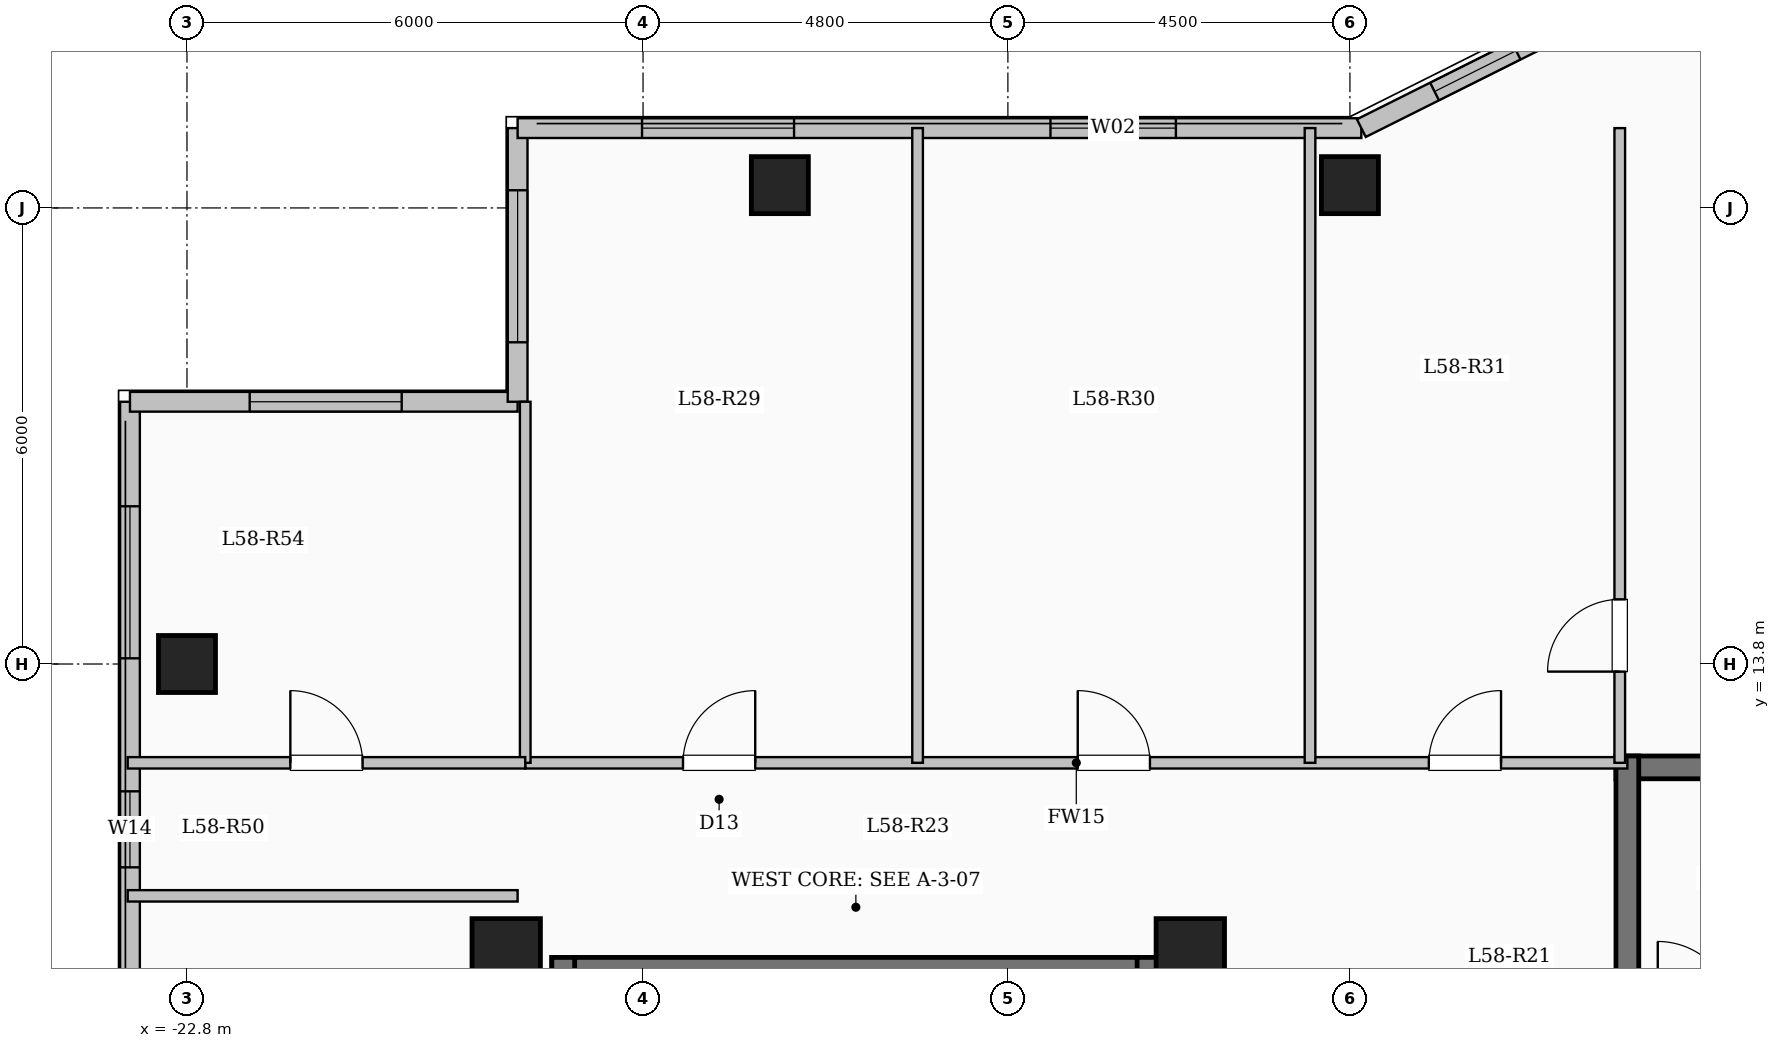
"""IFC4 building model, lengths in metres.
Left out: names, types, materials, properties, quantities, classifications, styles, units other than length and angle.
Written with IfcOpenShell. Run it as: python <this file> out.ifc"""

import sys

from ifc_helpers import new_model, si_unit, direction, frame, frame_2d, origin, origin_2d, place, context, subcontext, project, spatial, rectangle, extrude, element, fill, save


model = new_model("IFC4")
c1 = context("Model", 3, precision=1e-05, world=origin(), true_north=direction((0.0, 1.0)))
c2 = subcontext(c1, "Body", "Model", "MODEL_VIEW")
j1 = project(units=[si_unit("LENGTHUNIT", "METRE"), si_unit("PLANEANGLEUNIT", "RADIAN")], contexts=[c1])
p1 = place(None, origin())
s1 = spatial("IfcSite", under=j1, at=p1, CompositionType="ELEMENT")
p2 = place(p1, origin())
s2 = spatial("IfcBuilding", under=s1, at=p2, CompositionType="ELEMENT")
p3 = place(p2, frame((0.0, 0.0, 213.7)))
s3 = spatial("IfcBuildingStorey", under=s2, at=p3, CompositionType="ELEMENT", Elevation=213.7)
for number, where, z_axis, x_axis in (
    (1, (-9.6, 10.0, 0.0), (0.0, 0.0, 1.0), (1.0, 0.0, 0.0)),
    (2, (-18.6, 10.0, 0.0), (0.0, 0.0, 1.0), (1.0, 0.0, 0.0)),
):
    element("IfcColumn", number, at=place(p3, frame(where, z_axis=z_axis, x_axis=x_axis)), inside=s3, PredefinedType="COLUMN", context=c2, shape_type="SweptSolid", body=[
        extrude(rectangle(XDim=0.9, YDim=0.9, at=origin_2d()), origin(), (0.0, 0.0, 1.0), 3.35),
    ])
for number, where, z_axis, x_axis in (
    (3, (-15.0, 20.1, 0.0), (0.0, 0.0, 1.0), (1.0, 0.0, 0.0)),
    (4, (-7.5, 20.1, 0.0), (0.0, 0.0, 1.0), (1.0, 0.0, 0.0)),
    (5, (-22.8, 13.8, 0.0), (0.0, 0.0, 1.0), (1.0, 0.0, 0.0)),
):
    element("IfcColumn", number, at=place(p3, frame(where, z_axis=z_axis, x_axis=x_axis)), inside=s3, PredefinedType="COLUMN", context=c2, shape_type="SweptSolid", body=[
        extrude(rectangle(XDim=0.75, YDim=0.75, at=origin_2d()), origin(), (0.0, 0.0, 1.0), 3.35),
    ])
p4 = place(p3, frame((-23.55, -17.25, 0.0), z_axis=(0.0, 0.0, 1.0), x_axis=(0.0, 1.0, 0.0)))
e6 = element("IfcWall", 6, at=p4, inside=s3, PredefinedType="SOLIDWALL", context=c2, shape_type="SweptSolid", body=[
    extrude(rectangle(XDim=34.5, YDim=0.26, at=frame_2d((17.25, 0.0))), origin(), (0.0, 0.0, 1.0), 3.1),
])
p5 = place(p4, frame((2.825, 0.0, 0.9)))
e7 = element("IfcOpeningElement", 7, at=p5, cuts=e6, PredefinedType="OPENING", context=c2, shape_type="SweptSolid", body=[
    extrude(rectangle(XDim=2.2, YDim=1.75, at=frame_2d((1.1, 0.875))), frame((0.0, 0.14, 0.0), z_axis=(0.0, -1.0, 0.0), x_axis=(1.0, 0.0, 0.0)), (0.0, 0.0, 1.0), 0.28),
])
p6 = place(p4, frame((8.325, 0.0, 0.95)))
e8 = element("IfcOpeningElement", 8, at=p6, cuts=e6, PredefinedType="OPENING", context=c2, shape_type="SweptSolid", body=[
    extrude(rectangle(XDim=1.2, YDim=1.5, at=frame_2d((0.6, 0.75))), frame((0.0, 0.14, 0.0), z_axis=(0.0, -1.0, 0.0), x_axis=(1.0, 0.0, 0.0)), (0.0, 0.0, 1.0), 0.28),
])
p7 = place(p4, frame((18.0, 0.0, 0.9)))
e9 = element("IfcOpeningElement", 9, at=p7, cuts=e6, PredefinedType="OPENING", context=c2, shape_type="SweptSolid", body=[
    extrude(rectangle(XDim=2.0, YDim=1.7, at=frame_2d((1.0, 0.85))), frame((0.0, 0.14, 0.0), z_axis=(0.0, -1.0, 0.0), x_axis=(1.0, 0.0, 0.0)), (0.0, 0.0, 1.0), 0.28),
])
p8 = place(p4, frame((28.375, 0.0, 0.95)))
e10 = element("IfcOpeningElement", 10, at=p8, cuts=e6, PredefinedType="OPENING", context=c2, shape_type="SweptSolid", body=[
    extrude(rectangle(XDim=1.0, YDim=1.5, at=frame_2d((0.5, 0.75))), frame((0.0, 0.14, 0.0), z_axis=(0.0, -1.0, 0.0), x_axis=(1.0, 0.0, 0.0)), (0.0, 0.0, 1.0), 0.28),
])
p9 = place(p4, frame((31.125, 0.0, 0.9)))
e11 = element("IfcOpeningElement", 11, at=p9, cuts=e6, PredefinedType="OPENING", context=c2, shape_type="SweptSolid", body=[
    extrude(rectangle(XDim=2.0, YDim=1.7, at=frame_2d((1.0, 0.85))), frame((0.0, 0.14, 0.0), z_axis=(0.0, -1.0, 0.0), x_axis=(1.0, 0.0, 0.0)), (0.0, 0.0, 1.0), 0.28),
])
p10 = place(p3, frame((-23.55, 17.25, 0.0), z_axis=(0.0, 0.0, 1.0), x_axis=(1.0, 0.0, 0.0)))
e12 = element("IfcWall", 12, at=p10, inside=s3, PredefinedType="SOLIDWALL", context=c2, shape_type="SweptSolid", body=[
    extrude(rectangle(XDim=5.1, YDim=0.26, at=frame_2d((2.55, 0.0))), origin(), (0.0, 0.0, 1.0), 3.1),
])
p11 = place(p10, frame((1.575, 0.0, 0.9)))
e13 = element("IfcOpeningElement", 13, at=p11, cuts=e12, PredefinedType="OPENING", context=c2, shape_type="SweptSolid", body=[
    extrude(rectangle(XDim=2.0, YDim=1.7, at=frame_2d((1.0, 0.85))), frame((0.0, 0.14, 0.0), z_axis=(0.0, -1.0, 0.0), x_axis=(1.0, 0.0, 0.0)), (0.0, 0.0, 1.0), 0.28),
])
p12 = place(p3, frame((-18.45, 17.25, 0.0), z_axis=(0.0, 0.0, 1.0), x_axis=(0.0, 1.0, 0.0)))
e14 = element("IfcWall", 14, at=p12, inside=s3, PredefinedType="SOLIDWALL", context=c2, shape_type="SweptSolid", body=[
    extrude(rectangle(XDim=3.6, YDim=0.26, at=frame_2d((1.8, 0.0))), origin(), (0.0, 0.0, 1.0), 3.1),
])
p13 = place(p12, frame((0.782, 0.0, 0.9)))
e15 = element("IfcOpeningElement", 15, at=p13, cuts=e14, PredefinedType="OPENING", context=c2, shape_type="SweptSolid", body=[
    extrude(rectangle(XDim=2.0, YDim=1.7, at=frame_2d((1.0, 0.85))), frame((0.0, 0.14, 0.0), z_axis=(0.0, -1.0, 0.0), x_axis=(1.0, 0.0, 0.0)), (0.0, 0.0, 1.0), 0.28),
])
p14 = place(p3, frame((-18.45, 20.85, 0.0), z_axis=(0.0, 0.0, 1.0), x_axis=(1.0, 0.0, 0.0)))
e16 = element("IfcWall", 16, at=p14, inside=s3, PredefinedType="SOLIDWALL", context=c2, shape_type="SweptSolid", body=[
    extrude(rectangle(XDim=11.1, YDim=0.26, at=frame_2d((5.55, 0.0))), origin(), (0.0, 0.0, 1.0), 3.1),
])
p15 = place(p14, frame((1.637, 0.0, 0.9)))
e17 = element("IfcOpeningElement", 17, at=p15, cuts=e16, PredefinedType="OPENING", context=c2, shape_type="SweptSolid", body=[
    extrude(rectangle(XDim=2.0, YDim=1.7, at=frame_2d((1.0, 0.85))), frame((0.0, 0.14, 0.0), z_axis=(0.0, -1.0, 0.0), x_axis=(1.0, 0.0, 0.0)), (0.0, 0.0, 1.0), 0.28),
])
p16 = place(p14, frame((7.01, 0.0, 0.9)))
e18 = element("IfcOpeningElement", 18, at=p16, cuts=e16, PredefinedType="OPENING", context=c2, shape_type="SweptSolid", body=[
    extrude(rectangle(XDim=1.65, YDim=1.6, at=frame_2d((0.825, 0.8))), frame((0.0, 0.14, 0.0), z_axis=(0.0, -1.0, 0.0), x_axis=(1.0, 0.0, 0.0)), (0.0, 0.0, 1.0), 0.28),
])
p17 = place(p3, frame((-7.35, 20.85, 0.0), z_axis=(0.0, 0.0, 1.0), x_axis=(0.894427191, 0.4472135955, 0.0)))
e19 = element("IfcWall", 19, at=p17, inside=s3, PredefinedType="SOLIDWALL", context=c2, shape_type="SweptSolid", body=[
    extrude(rectangle(XDim=3.354, YDim=0.26, at=frame_2d((1.677, 0.0))), origin(), (0.0, 0.0, 1.0), 3.1),
])
p18 = place(p17, frame((1.077, 0.0, 0.95)))
e20 = element("IfcOpeningElement", 20, at=p18, cuts=e19, PredefinedType="OPENING", context=c2, shape_type="SweptSolid", body=[
    extrude(rectangle(XDim=1.2, YDim=1.5, at=frame_2d((0.6, 0.75))), frame((0.0, 0.14, 0.0), z_axis=(0.0, -1.0, 0.0), x_axis=(1.0, 0.0, 0.0)), (0.0, 0.0, 1.0), 0.28),
])
p19 = place(p3, frame((-18.0, 9.79, 0.0), z_axis=(0.0, 0.0, 1.0), x_axis=(1.0, 0.0, 0.0)))
e21 = element("IfcWall", 21, at=p19, inside=s3, PredefinedType="SHEAR", context=c2, shape_type="SweptSolid", body=[
    extrude(rectangle(XDim=8.0, YDim=0.3, at=frame_2d((4.0, 0.0))), origin(), (0.0, 0.0, 1.0), 3.35),
])
for number, where, z_axis, x_axis in (
    (22, (-17.85, 6.35, 0.0), (0.0, 0.0, 1.0), (0.0, 1.0, 0.0)),
    (23, (-10.15, 6.35, 0.0), (0.0, 0.0, 1.0), (0.0, 1.0, 0.0)),
):
    element("IfcWall", number, at=place(p3, frame(where, z_axis=z_axis, x_axis=x_axis)), inside=s3, PredefinedType="SHEAR", context=c2, shape_type="SweptSolid", body=[
        extrude(rectangle(XDim=3.59, YDim=0.3, at=frame_2d((1.795, 0.0))), origin(), (0.0, 0.0, 1.0), 3.35),
    ])
p20 = place(p3, frame((-4.0, 12.44, 0.0), z_axis=(0.0, 0.0, 1.0), x_axis=(1.0, 0.0, 0.0)))
e24 = element("IfcWall", 24, at=p20, inside=s3, PredefinedType="SHEAR", context=c2, shape_type="SweptSolid", body=[
    extrude(rectangle(XDim=8.0, YDim=0.3, at=frame_2d((4.0, 0.0))), origin(), (0.0, 0.0, 1.0), 3.35),
])
p21 = place(p3, frame((-3.85, 9.0, 0.0), z_axis=(0.0, 0.0, 1.0), x_axis=(0.0, 1.0, 0.0)))
e25 = element("IfcWall", 25, at=p21, inside=s3, PredefinedType="SHEAR", context=c2, shape_type="SweptSolid", body=[
    extrude(rectangle(XDim=3.59, YDim=0.3, at=frame_2d((1.795, 0.0))), origin(), (0.0, 0.0, 1.0), 3.35),
])
p22 = place(p3, frame((-18.35, 12.5, 0.0), z_axis=(0.0, 0.0, 1.0), x_axis=(1.0, 0.0, 0.0)))
e26 = element("IfcWall", 26, at=p22, inside=s3, PredefinedType="PARTITIONING", context=c2, shape_type="SweptSolid", body=[
    extrude(rectangle(XDim=14.5, YDim=0.15, at=frame_2d((7.25, 0.0))), origin(), (0.0, 0.0, 1.0), 3.1),
])
p23 = place(p22, frame((2.076, 0.0, 0.0)))
e27 = element("IfcOpeningElement", 27, at=p23, cuts=e26, PredefinedType="OPENING", context=c2, shape_type="SweptSolid", body=[
    extrude(rectangle(XDim=0.95, YDim=2.15, at=frame_2d((0.475, 1.075))), frame((0.0, 0.085, 0.0), z_axis=(0.0, -1.0, 0.0), x_axis=(1.0, 0.0, 0.0)), (0.0, 0.0, 1.0), 0.17),
])
p24 = place(p22, frame((7.269, 0.0, 0.0)))
e28 = element("IfcOpeningElement", 28, at=p24, cuts=e26, PredefinedType="OPENING", context=c2, shape_type="SweptSolid", body=[
    extrude(rectangle(XDim=0.95, YDim=2.15, at=frame_2d((0.475, 1.075))), frame((0.0, 0.085, 0.0), z_axis=(0.0, -1.0, 0.0), x_axis=(1.0, 0.0, 0.0)), (0.0, 0.0, 1.0), 0.17),
])
p25 = place(p22, frame((11.888, 0.0, 0.0)))
e29 = element("IfcOpeningElement", 29, at=p25, cuts=e26, PredefinedType="OPENING", context=c2, shape_type="SweptSolid", body=[
    extrude(rectangle(XDim=0.95, YDim=2.15, at=frame_2d((0.475, 1.075))), frame((0.0, 0.085, 0.0), z_axis=(0.0, -1.0, 0.0), x_axis=(1.0, 0.0, 0.0)), (0.0, 0.0, 1.0), 0.17),
])
p26 = place(p3, frame((-3.95, 12.5, 0.0), z_axis=(0.0, 0.0, 1.0), x_axis=(0.0, 1.0, 0.0)))
e30 = element("IfcWall", 30, at=p26, inside=s3, PredefinedType="PARTITIONING", context=c2, shape_type="SweptSolid", body=[
    extrude(rectangle(XDim=8.35, YDim=0.14, at=frame_2d((4.175, 0.0))), origin(), (0.0, 0.0, 1.0), 3.1),
])
p27 = place(p26, frame((1.2, 0.0, 0.0)))
e31 = element("IfcOpeningElement", 31, at=p27, cuts=e30, PredefinedType="OPENING", context=c2, shape_type="SweptSolid", body=[
    extrude(rectangle(XDim=0.95, YDim=2.15, at=frame_2d((0.475, 1.075))), frame((0.0, 0.08, 0.0), z_axis=(0.0, -1.0, 0.0), x_axis=(1.0, 0.0, 0.0)), (0.0, 0.0, 1.0), 0.16),
])
p28 = place(p3, frame((-13.188, 12.5, 0.0), z_axis=(0.0, 0.0, 1.0), x_axis=(0.0, 1.0, 0.0)))
e32 = element("IfcWall", 32, at=p28, inside=s3, PredefinedType="PARTITIONING", context=c2, shape_type="SweptSolid", body=[
    extrude(rectangle(XDim=8.35, YDim=0.14, at=frame_2d((4.175, 0.0))), origin(), (0.0, 0.0, 1.0), 3.1),
])
p29 = place(p3, frame((-8.025, 12.5, 0.0), z_axis=(0.0, 0.0, 1.0), x_axis=(0.0, 1.0, 0.0)))
e33 = element("IfcWall", 33, at=p29, inside=s3, PredefinedType="PARTITIONING", context=c2, shape_type="SweptSolid", body=[
    extrude(rectangle(XDim=8.35, YDim=0.14, at=frame_2d((4.175, 0.0))), origin(), (0.0, 0.0, 1.0), 2.585),
])
p30 = place(p3, frame((-23.58, 10.75, 0.0), z_axis=(0.0, 0.0, 1.0), x_axis=(1.0, 0.0, 0.0)))
e34 = element("IfcWall", 34, at=p30, inside=s3, PredefinedType="PARTITIONING", context=c2, shape_type="SweptSolid", body=[
    extrude(rectangle(XDim=5.13, YDim=0.15, at=frame_2d((2.565, 0.0))), origin(), (0.0, 0.0, 1.0), 3.1),
])
p31 = place(p3, frame((-18.35, 12.5, 0.0), z_axis=(0.0, 0.0, 1.0), x_axis=(0.0, 1.0, 0.0)))
e35 = element("IfcWall", 35, at=p31, inside=s3, PredefinedType="PARTITIONING", context=c2, shape_type="SweptSolid", body=[
    extrude(rectangle(XDim=4.75, YDim=0.14, at=frame_2d((2.375, 0.0))), origin(), (0.0, 0.0, 1.0), 3.1),
])
p32 = place(p3, frame((-23.58, 12.5, 0.0), z_axis=(0.0, 0.0, 1.0), x_axis=(1.0, 0.0, 0.0)))
e36 = element("IfcWall", 36, at=p32, inside=s3, PredefinedType="PARTITIONING", context=c2, shape_type="SweptSolid", body=[
    extrude(rectangle(XDim=5.23, YDim=0.15, at=frame_2d((2.615, 0.0))), origin(), (0.0, 0.0, 1.0), 3.1),
])
p33 = place(p32, frame((2.14, 0.0, 0.0)))
e37 = element("IfcOpeningElement", 37, at=p33, cuts=e36, PredefinedType="OPENING", context=c2, shape_type="SweptSolid", body=[
    extrude(rectangle(XDim=0.95, YDim=2.15, at=frame_2d((0.475, 1.075))), frame((0.0, 0.085, 0.0), z_axis=(0.0, -1.0, 0.0), x_axis=(1.0, 0.0, 0.0)), (0.0, 0.0, 1.0), 0.17),
])
p34 = place(p8, origin())
e38 = element("IfcWindow", 38, at=p34, inside=s3, PartitioningType="SINGLE_PANEL", PredefinedType="WINDOW", context=c2, shape_type="SweptSolid", body=[
    extrude(rectangle(XDim=1.0, YDim=1.5, at=frame_2d((0.5, 0.75))), frame((0.0, 0.03, 0.0), z_axis=(0.0, -1.0, 0.0), x_axis=(1.0, 0.0, 0.0)), (0.0, 0.0, 1.0), 0.06),
])
fill(e10, e38)
p35 = place(p9, origin())
e39 = element("IfcWindow", 39, at=p35, inside=s3, PartitioningType="SINGLE_PANEL", PredefinedType="WINDOW", context=c2, shape_type="SweptSolid", body=[
    extrude(rectangle(XDim=2.0, YDim=1.7, at=frame_2d((1.0, 0.85))), frame((0.0, 0.03, 0.0), z_axis=(0.0, -1.0, 0.0), x_axis=(1.0, 0.0, 0.0)), (0.0, 0.0, 1.0), 0.06),
])
fill(e11, e39)
p36 = place(p11, origin())
e40 = element("IfcWindow", 40, at=p36, inside=s3, PartitioningType="SINGLE_PANEL", PredefinedType="WINDOW", context=c2, shape_type="SweptSolid", body=[
    extrude(rectangle(XDim=2.0, YDim=1.7, at=frame_2d((1.0, 0.85))), frame((0.0, 0.03, 0.0), z_axis=(0.0, -1.0, 0.0), x_axis=(1.0, 0.0, 0.0)), (0.0, 0.0, 1.0), 0.06),
])
fill(e13, e40)
p37 = place(p13, origin())
e41 = element("IfcWindow", 41, at=p37, inside=s3, PartitioningType="SINGLE_PANEL", PredefinedType="WINDOW", context=c2, shape_type="SweptSolid", body=[
    extrude(rectangle(XDim=2.0, YDim=1.7, at=frame_2d((1.0, 0.85))), frame((0.0, 0.03, 0.0), z_axis=(0.0, -1.0, 0.0), x_axis=(1.0, 0.0, 0.0)), (0.0, 0.0, 1.0), 0.06),
])
fill(e15, e41)
p38 = place(p15, origin())
e42 = element("IfcWindow", 42, at=p38, inside=s3, PartitioningType="SINGLE_PANEL", PredefinedType="WINDOW", context=c2, shape_type="SweptSolid", body=[
    extrude(rectangle(XDim=2.0, YDim=1.7, at=frame_2d((1.0, 0.85))), frame((0.0, 0.03, 0.0), z_axis=(0.0, -1.0, 0.0), x_axis=(1.0, 0.0, 0.0)), (0.0, 0.0, 1.0), 0.06),
])
fill(e17, e42)
p39 = place(p16, origin())
e43 = element("IfcWindow", 43, at=p39, inside=s3, PartitioningType="SINGLE_PANEL", PredefinedType="WINDOW", context=c2, shape_type="SweptSolid", body=[
    extrude(rectangle(XDim=1.65, YDim=1.6, at=frame_2d((0.825, 0.8))), frame((0.0, 0.03, 0.0), z_axis=(0.0, -1.0, 0.0), x_axis=(1.0, 0.0, 0.0)), (0.0, 0.0, 1.0), 0.06),
])
fill(e18, e43)
p40 = place(p18, origin())
e44 = element("IfcWindow", 44, at=p40, inside=s3, PartitioningType="SINGLE_PANEL", PredefinedType="WINDOW", context=c2, shape_type="SweptSolid", body=[
    extrude(rectangle(XDim=1.2, YDim=1.5, at=frame_2d((0.6, 0.75))), frame((0.0, 0.03, 0.0), z_axis=(0.0, -1.0, 0.0), x_axis=(1.0, 0.0, 0.0)), (0.0, 0.0, 1.0), 0.06),
])
fill(e20, e44)
p41 = place(p23, origin())
e45 = element("IfcDoor", 45, at=p41, inside=s3, OperationType="SINGLE_SWING_RIGHT", PredefinedType="DOOR", context=c2, shape_type="SweptSolid", body=[
    extrude(rectangle(XDim=0.95, YDim=2.15, at=frame_2d((0.475, 1.075))), frame((0.0, 0.025, 0.0), z_axis=(0.0, -1.0, 0.0), x_axis=(1.0, 0.0, 0.0)), (0.0, 0.0, 1.0), 0.05),
])
fill(e27, e45)
p42 = place(p24, origin())
e46 = element("IfcDoor", 46, at=p42, inside=s3, OperationType="SINGLE_SWING_LEFT", PredefinedType="DOOR", context=c2, shape_type="SweptSolid", body=[
    extrude(rectangle(XDim=0.95, YDim=2.15, at=frame_2d((0.475, 1.075))), frame((0.0, 0.025, 0.0), z_axis=(0.0, -1.0, 0.0), x_axis=(1.0, 0.0, 0.0)), (0.0, 0.0, 1.0), 0.05),
])
fill(e28, e46)
p43 = place(p25, origin())
e47 = element("IfcDoor", 47, at=p43, inside=s3, OperationType="SINGLE_SWING_RIGHT", PredefinedType="DOOR", context=c2, shape_type="SweptSolid", body=[
    extrude(rectangle(XDim=0.95, YDim=2.15, at=frame_2d((0.475, 1.075))), frame((0.0, 0.025, 0.0), z_axis=(0.0, -1.0, 0.0), x_axis=(1.0, 0.0, 0.0)), (0.0, 0.0, 1.0), 0.05),
])
fill(e29, e47)
p44 = place(p27, origin())
e48 = element("IfcDoor", 48, at=p44, inside=s3, OperationType="SINGLE_SWING_LEFT", PredefinedType="DOOR", context=c2, shape_type="SweptSolid", body=[
    extrude(rectangle(XDim=0.95, YDim=2.15, at=frame_2d((0.475, 1.075))), frame((0.0, 0.025, 0.0), z_axis=(0.0, -1.0, 0.0), x_axis=(1.0, 0.0, 0.0)), (0.0, 0.0, 1.0), 0.05),
])
fill(e31, e48)
p45 = place(p33, origin())
e49 = element("IfcDoor", 49, at=p45, inside=s3, OperationType="SINGLE_SWING_LEFT", PredefinedType="DOOR", context=c2, shape_type="SweptSolid", body=[
    extrude(rectangle(XDim=0.95, YDim=2.15, at=frame_2d((0.475, 1.075))), frame((0.0, 0.025, 0.0), z_axis=(0.0, -1.0, 0.0), x_axis=(1.0, 0.0, 0.0)), (0.0, 0.0, 1.0), 0.05),
])
fill(e37, e49)
save(model, sys.argv[1])
